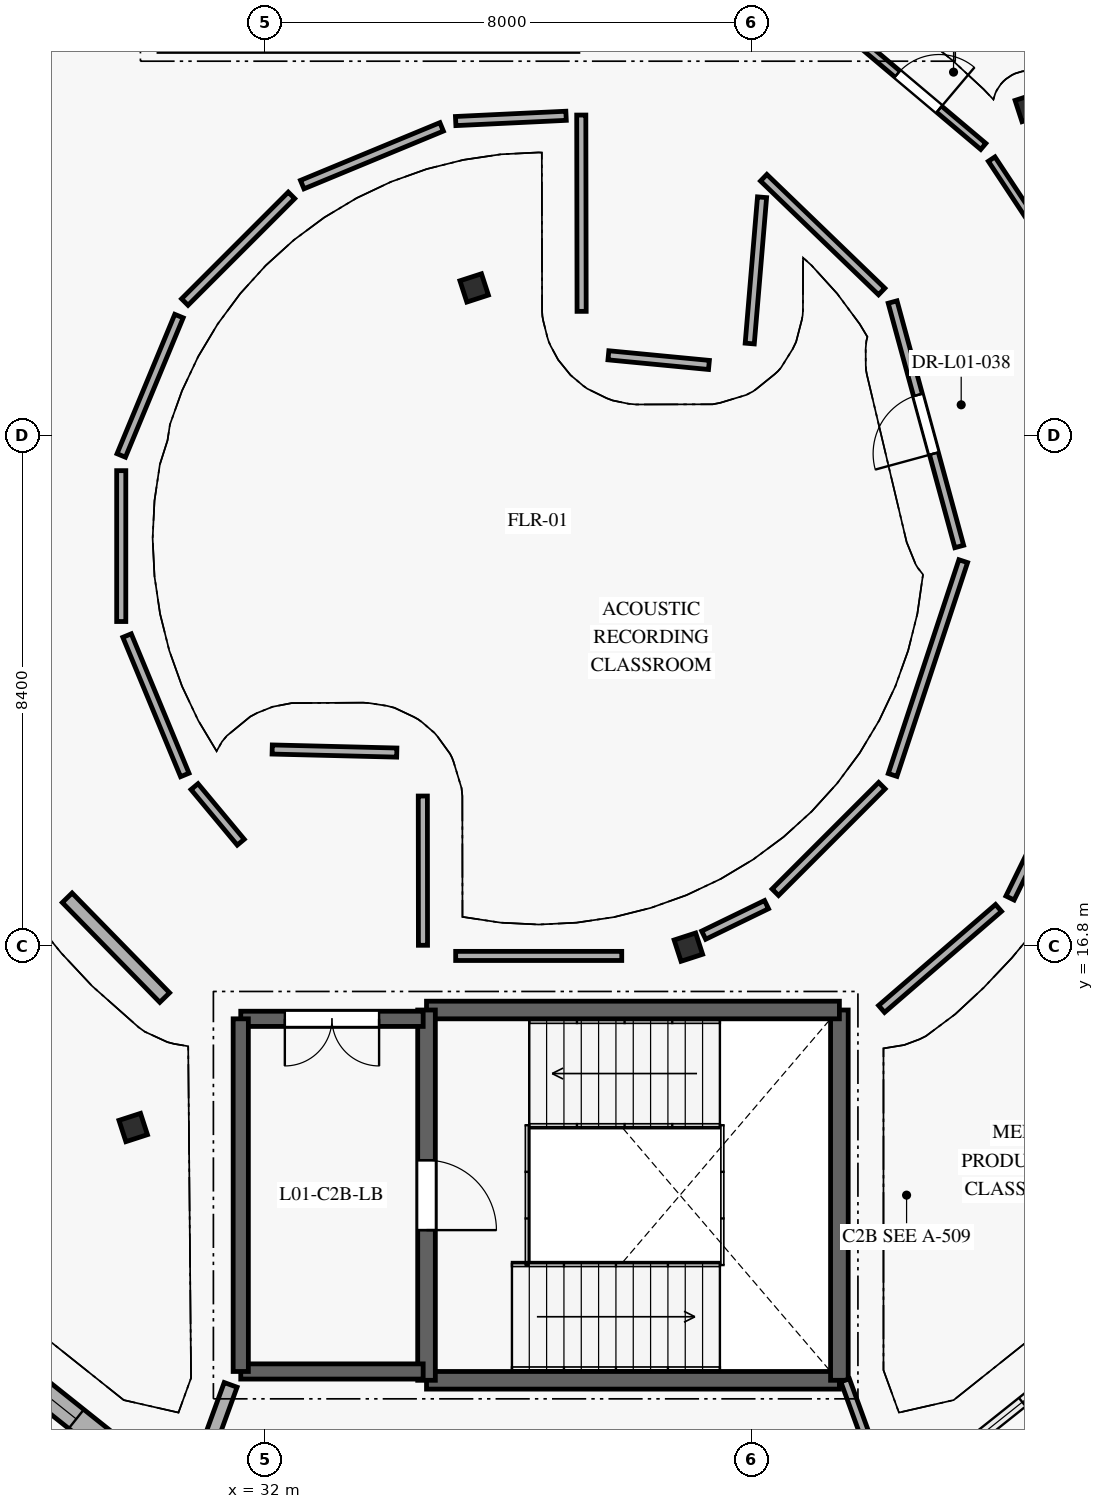
"""IFC4 building model, lengths in metres.
Left out: names, types, materials, properties, quantities, classifications, styles, units other than length and angle.
Written with IfcOpenShell. Run it as: python <this file> out.ifc"""

import sys

from ifc_helpers import new_model, si_unit, direction, frame, frame_2d, origin, origin_2d, place, context, subcontext, project, spatial, rectangle, i_section, extrude, element, fill, save


model = new_model("IFC4")
c1 = context("Model", 3, precision=1e-05, world=origin(), true_north=direction((0.0, 1.0)))
c2 = subcontext(c1, "Body", "Model", "MODEL_VIEW")
j1 = project(units=[si_unit("LENGTHUNIT", "METRE"), si_unit("PLANEANGLEUNIT", "RADIAN")], contexts=[c1])
p1 = place(None, origin())
s1 = spatial("IfcSite", under=j1, at=p1, CompositionType="ELEMENT")
p2 = place(p1, origin())
s2 = spatial("IfcBuilding", under=s1, at=p2, CompositionType="ELEMENT")
p3 = place(p2, frame((0.0, 0.0, 4.2)))
s3 = spatial("IfcBuildingStorey", under=s2, at=p3, CompositionType="ELEMENT", Elevation=4.2)
for number, where, z_axis, x_axis in (
    (1, (29.831, 13.812, 0.0), (0.0, 0.0, 1.0), (0.951, 0.309, 0.0)),
    (2, (38.961, 16.779, 0.0), (0.0, 0.0, 1.0), (0.951, 0.309, 0.0)),
    (3, (35.439, 27.621, 0.0), (0.0, 0.0, 1.0), (0.951, 0.309, 0.0)),
    (4, (44.569, 30.588, 0.0), (0.0, 0.0, 1.0), (0.951, 0.309, 0.0)),
):
    element("IfcColumn", number, at=place(p3, frame(where, z_axis=z_axis, x_axis=x_axis)), inside=s3, PredefinedType="COLUMN", context=c2, shape_type="SweptSolid", body=[
        extrude(i_section(OverallWidth=0.373, OverallDepth=0.368, WebThickness=0.014, FlangeThickness=0.024, FilletRadius=0.015, at=origin_2d()), origin(), (0.0, 0.0, 1.0), 4.2),
    ])
p4 = place(p3, frame((29.351, 8.655, 0.0), z_axis=(0.0, 0.0, 1.0), x_axis=(-0.781819636461, 0.623504655992, 0.0)))
e5 = element("IfcWall", 5, at=p4, inside=s3, PredefinedType="SOLIDWALL", context=c2, shape_type="SweptSolid", body=[
    extrude(rectangle(XDim=7.333, YDim=0.4, at=frame_2d((3.667, 0.0))), origin(), (0.0, 0.0, 1.0), 3.94),
])
p5 = place(p4, frame((0.583, 0.0, 0.85)))
e6 = element("IfcOpeningElement", 6, at=p5, cuts=e5, PredefinedType="OPENING", context=c2, shape_type="SweptSolid", body=[
    extrude(rectangle(XDim=2.5, YDim=1.3, at=frame_2d((1.25, 0.65))), frame((0.0, 0.21, 0.0), z_axis=(0.0, -1.0, 0.0), x_axis=(1.0, 0.0, 0.0)), (0.0, 0.0, 1.0), 0.42),
])
p6 = place(p4, frame((4.925, 0.0, 0.85)))
e7 = element("IfcOpeningElement", 7, at=p6, cuts=e5, PredefinedType="OPENING", context=c2, shape_type="SweptSolid", body=[
    extrude(rectangle(XDim=1.15, YDim=1.5, at=frame_2d((0.575, 0.75))), frame((0.0, 0.21, 0.0), z_axis=(0.0, -1.0, 0.0), x_axis=(1.0, 0.0, 0.0)), (0.0, 0.0, 1.0), 0.42),
])
p7 = place(p3, frame((23.037, 12.27, 0.0), z_axis=(0.0, 0.0, 1.0), x_axis=(0.781821002863, -0.623502942641, 0.0)))
e8 = element("IfcWall", 8, at=p7, inside=s3, PredefinedType="ELEMENTEDWALL", context=c2, shape_type="SweptSolid", body=[
    extrude(rectangle(XDim=7.047, YDim=0.225, at=frame_2d((3.524, 0.0))), origin(), (0.0, 0.0, 1.0), 1.09),
])
p8 = place(p3, frame((44.452, 7.876, 0.0), z_axis=(0.0, 0.0, 1.0), x_axis=(0.781844515492, 0.623473458613, 0.0)))
e9 = element("IfcWall", 9, at=p8, inside=s3, PredefinedType="ELEMENTEDWALL", context=c2, shape_type="SweptSolid", body=[
    extrude(rectangle(XDim=7.048, YDim=0.225, at=frame_2d((3.524, 0.0))), origin(), (0.0, 0.0, 1.0), 1.09),
])
p9 = place(p3, frame((34.655, 9.655, 0.0), z_axis=(0.0, 0.0, 1.0), x_axis=(1.0, 0.0, 0.0)))
e10 = element("IfcWall", 10, at=p9, inside=s3, PredefinedType="SHEAR", context=c2, shape_type="SweptSolid", body=[
    extrude(rectangle(XDim=6.79, YDim=0.29, at=frame_2d((3.395, 0.0))), origin(), (0.0, 0.0, 1.0), 3.95),
])
p10 = place(p3, frame((41.445, 9.655, 0.0), z_axis=(0.0, 0.0, 1.0), x_axis=(0.0, 1.0, 0.0)))
e11 = element("IfcWall", 11, at=p10, inside=s3, PredefinedType="SHEAR", context=c2, shape_type="SweptSolid", body=[
    extrude(rectangle(XDim=6.09, YDim=0.29, at=frame_2d((3.045, 0.0))), origin(), (0.0, 0.0, 1.0), 3.95),
])
p11 = place(p3, frame((41.445, 15.745, 0.0), z_axis=(0.0, 0.0, 1.0), x_axis=(-1.0, 0.0, 0.0)))
e12 = element("IfcWall", 12, at=p11, inside=s3, PredefinedType="SHEAR", context=c2, shape_type="SweptSolid", body=[
    extrude(rectangle(XDim=6.79, YDim=0.29, at=frame_2d((3.395, 0.0))), origin(), (0.0, 0.0, 1.0), 3.95),
])
p12 = place(p3, frame((34.655, 15.745, 0.0), z_axis=(0.0, 0.0, 1.0), x_axis=(0.0, -1.0, 0.0)))
e13 = element("IfcWall", 13, at=p12, inside=s3, PredefinedType="SHEAR", context=c2, shape_type="SweptSolid", body=[
    extrude(rectangle(XDim=6.09, YDim=0.29, at=frame_2d((3.045, 0.0))), origin(), (0.0, 0.0, 1.0), 3.95),
])
p13 = place(p12, frame((2.47, 0.0, 0.0)))
e14 = element("IfcOpeningElement", 14, at=p13, cuts=e13, PredefinedType="OPENING", context=c2, shape_type="SweptSolid", body=[
    extrude(rectangle(XDim=1.15, YDim=2.1, at=frame_2d((0.575, 1.05))), frame((0.0, 0.155, 0.0), z_axis=(0.0, -1.0, 0.0), x_axis=(1.0, 0.0, 0.0)), (0.0, 0.0, 1.0), 0.31),
])
p14 = place(p3, frame((31.6, 9.8, 0.0), z_axis=(0.0, 0.0, 1.0), x_axis=(1.0, 0.0, 0.0)))
e15 = element("IfcWall", 15, at=p14, inside=s3, PredefinedType="SHEAR", context=c2, shape_type="SweptSolid", body=[
    extrude(rectangle(XDim=3.0, YDim=0.25, at=frame_2d((1.5, 0.0))), origin(), (0.0, 0.0, 1.0), 3.95),
])
p15 = place(p3, frame((34.6, 15.6, 0.0), z_axis=(0.0, 0.0, 1.0), x_axis=(-1.0, 0.0, 0.0)))
e16 = element("IfcWall", 16, at=p15, inside=s3, PredefinedType="SHEAR", context=c2, shape_type="SweptSolid", body=[
    extrude(rectangle(XDim=3.0, YDim=0.25, at=frame_2d((1.5, 0.0))), origin(), (0.0, 0.0, 1.0), 3.95),
])
p16 = place(p15, frame((0.725, 0.0, 0.0)))
e17 = element("IfcOpeningElement", 17, at=p16, cuts=e16, PredefinedType="OPENING", context=c2, shape_type="SweptSolid", body=[
    extrude(rectangle(XDim=1.55, YDim=2.15, at=frame_2d((0.775, 1.075))), frame((0.0, 0.135, 0.0), z_axis=(0.0, -1.0, 0.0), x_axis=(1.0, 0.0, 0.0)), (0.0, 0.0, 1.0), 0.27),
])
p17 = place(p3, frame((31.6, 15.6, 0.0), z_axis=(0.0, 0.0, 1.0), x_axis=(0.0, -1.0, 0.0)))
e18 = element("IfcWall", 18, at=p17, inside=s3, PredefinedType="SHEAR", context=c2, shape_type="SweptSolid", body=[
    extrude(rectangle(XDim=5.8, YDim=0.25, at=frame_2d((2.9, 0.0))), origin(), (0.0, 0.0, 1.0), 3.95),
])
p18 = place(p3, frame((30.997, 8.382, 0.0), z_axis=(0.0, 0.0, 1.0), x_axis=(0.342065800562, 0.939676001655, 0.0)))
e19 = element("IfcWall", 19, at=p18, inside=s3, PredefinedType="PARTITIONING", context=c2, shape_type="SweptSolid", body=[
    extrude(rectangle(XDim=1.275, YDim=0.225, at=frame_2d((0.638, 0.0))), origin(), (0.0, 0.0, 1.0), 3.9),
])
p19 = place(p3, frame((30.349, 15.95, 0.0), z_axis=(0.0, 0.0, 1.0), x_axis=(-0.698811708899, 0.715305665786, 0.0)))
e20 = element("IfcWall", 20, at=p19, inside=s3, PredefinedType="PARTITIONING", context=c2, shape_type="SweptSolid", body=[
    extrude(rectangle(XDim=2.294, YDim=0.225, at=frame_2d((1.147, 0.0))), origin(), (0.0, 0.0, 1.0), 3.9),
])
p20 = place(p3, frame((40.247, 17.478, 0.0), z_axis=(0.0, 0.0, 1.0), x_axis=(-0.899429373924, -0.437066129234, 0.0)))
e21 = element("IfcWall", 21, at=p20, inside=s3, PredefinedType="PARTITIONING", context=c2, shape_type="SweptSolid", body=[
    extrude(rectangle(XDim=1.148, YDim=0.15, at=frame_2d((0.574, 0.0))), origin(), (0.0, 0.0, 1.0), 3.219),
])
p21 = place(p3, frame((41.539, 9.655, 0.0), z_axis=(0.0, 0.0, 1.0), x_axis=(0.341945571893, -0.939719759217, 0.0)))
e22 = element("IfcWall", 22, at=p21, inside=s3, PredefinedType="PARTITIONING", context=c2, shape_type="SweptSolid", body=[
    extrude(rectangle(XDim=1.355, YDim=0.15, at=frame_2d((0.678, 0.0))), origin(), (0.0, 0.0, 1.0), 3.9),
])
p22 = place(p3, frame((45.814, 20.779, 0.0), z_axis=(0.0, 0.0, 1.0), x_axis=(-0.439779254339, -0.89810589991, 0.0)))
e23 = element("IfcWall", 23, at=p22, inside=s3, PredefinedType="PARTITIONING", context=c2, shape_type="SweptSolid", body=[
    extrude(rectangle(XDim=3.554, YDim=0.15, at=frame_2d((1.777, 0.0))), origin(), (0.0, 0.0, 1.0), 3.9),
])
p23 = place(p3, frame((44.062, 17.424, 0.0), z_axis=(0.0, 0.0, 1.0), x_axis=(-0.756768999512, -0.653682401, 0.0)))
e24 = element("IfcWall", 24, at=p23, inside=s3, PredefinedType="PARTITIONING", context=c2, shape_type="SweptSolid", body=[
    extrude(rectangle(XDim=2.541, YDim=0.15, at=frame_2d((1.271, 0.0))), origin(), (0.0, 0.0, 1.0), 3.9),
])
p24 = place(p3, frame((41.673, 31.752, 0.0), z_axis=(0.0, 0.0, 1.0), x_axis=(0.764524009618, -0.644595251858, 0.0)))
e25 = element("IfcWall", 25, at=p24, inside=s3, PredefinedType="PARTITIONING", context=c2, shape_type="SweptSolid", body=[
    extrude(rectangle(XDim=2.797, YDim=0.13, at=frame_2d((1.398, 0.0))), origin(), (0.0, 0.0, 1.0), 3.9),
])
p25 = place(p24, frame((0.948, 0.0, 0.0)))
e26 = element("IfcOpeningElement", 26, at=p25, cuts=e25, PredefinedType="OPENING", context=c2, shape_type="SweptSolid", body=[
    extrude(rectangle(XDim=0.9, YDim=2.05, at=frame_2d((0.45, 1.025))), frame((0.0, 0.075, 0.0), z_axis=(0.0, -1.0, 0.0), x_axis=(1.0, 0.0, 0.0)), (0.0, 0.0, 1.0), 0.15),
])
p26 = place(p3, frame((43.949, 29.74, 0.0), z_axis=(0.0, 0.0, 1.0), x_axis=(0.551022081773, -0.83449066226, 0.0)))
e27 = element("IfcWall", 27, at=p26, inside=s3, PredefinedType="PARTITIONING", context=c2, shape_type="SweptSolid", body=[
    extrude(rectangle(XDim=2.439, YDim=0.13, at=frame_2d((1.22, 0.0))), origin(), (0.0, 0.0, 1.0), 3.369),
])
p27 = place(p3, frame((42.32, 19.611, 0.0), z_axis=(0.0, 0.0, 1.0), x_axis=(0.313635484033, 0.949543460383, 0.0)))
e28 = element("IfcWall", 28, at=p27, inside=s3, PredefinedType="PARTITIONING", context=c2, shape_type="SweptSolid", body=[
    extrude(rectangle(XDim=3.703, YDim=0.15, at=frame_2d((1.852, 0.0))), origin(), (0.0, 0.0, 1.0), 3.9),
])
p28 = place(p3, frame((43.416, 23.368, 0.0), z_axis=(0.0, 0.0, 1.0), x_axis=(-0.262938935949, 0.964812477097, 0.0)))
e29 = element("IfcWall", 29, at=p28, inside=s3, PredefinedType="PARTITIONING", context=c2, shape_type="SweptSolid", body=[
    extrude(rectangle(XDim=4.167, YDim=0.15, at=frame_2d((2.083, 0.0))), origin(), (0.0, 0.0, 1.0), 3.9),
])
p29 = place(p28, frame((1.584, 0.0, 0.0)))
e30 = element("IfcOpeningElement", 30, at=p29, cuts=e29, PredefinedType="OPENING", context=c2, shape_type="SweptSolid", body=[
    extrude(rectangle(XDim=1.0, YDim=2.1, at=frame_2d((0.5, 1.05))), frame((0.0, 0.085, 0.0), z_axis=(0.0, -1.0, 0.0), x_axis=(1.0, 0.0, 0.0)), (0.0, 0.0, 1.0), 0.17),
])
p30 = place(p3, frame((42.141, 27.562, 0.0), z_axis=(0.0, 0.0, 1.0), x_axis=(-0.719849143542, 0.694130542867, 0.0)))
e31 = element("IfcWall", 31, at=p30, inside=s3, PredefinedType="PARTITIONING", context=c2, shape_type="SweptSolid", body=[
    extrude(rectangle(XDim=2.696, YDim=0.15, at=frame_2d((1.348, 0.0))), origin(), (0.0, 0.0, 1.0), 3.9),
])
p31 = place(p3, frame((40.173, 29.112, 0.0), z_axis=(0.0, 0.0, 1.0), x_axis=(-0.083924087796, -0.996472150884, 0.0)))
e32 = element("IfcWall", 32, at=p31, inside=s3, PredefinedType="PARTITIONING", context=c2, shape_type="SweptSolid", body=[
    extrude(rectangle(XDim=2.415, YDim=0.15, at=frame_2d((1.207, 0.0))), origin(), (0.0, 0.0, 1.0), 3.9),
])
p32 = place(p3, frame((39.3, 26.354, 0.0), z_axis=(0.0, 0.0, 1.0), x_axis=(-0.995426515274, 0.095530375746, 0.0)))
e33 = element("IfcWall", 33, at=p32, inside=s3, PredefinedType="PARTITIONING", context=c2, shape_type="SweptSolid", body=[
    extrude(rectangle(XDim=1.661, YDim=0.15, at=frame_2d((0.831, 0.0))), origin(), (0.0, 0.0, 1.0), 3.9),
])
p33 = place(p3, frame((37.206, 27.236, 0.0), z_axis=(0.0, 0.0, 1.0), x_axis=(-0.001814879044, 0.999998353106, 0.0)))
e34 = element("IfcWall", 34, at=p33, inside=s3, PredefinedType="PARTITIONING", context=c2, shape_type="SweptSolid", body=[
    extrude(rectangle(XDim=3.229, YDim=0.15, at=frame_2d((1.614, 0.0))), origin(), (0.0, 0.0, 1.0), 3.9),
])
p34 = place(p3, frame((36.95, 30.452, 0.0), z_axis=(0.0, 0.0, 1.0), x_axis=(-0.998855948809, -0.04782043004, 0.0)))
e35 = element("IfcWall", 35, at=p34, inside=s3, PredefinedType="PARTITIONING", context=c2, shape_type="SweptSolid", body=[
    extrude(rectangle(XDim=1.818, YDim=0.15, at=frame_2d((0.909, 0.0))), origin(), (0.0, 0.0, 1.0), 3.9),
])
p35 = place(p3, frame((34.904, 30.27, 0.0), z_axis=(0.0, 0.0, 1.0), x_axis=(-0.92387534344, -0.38269354552, 0.0)))
e36 = element("IfcWall", 36, at=p35, inside=s3, PredefinedType="PARTITIONING", context=c2, shape_type="SweptSolid", body=[
    extrude(rectangle(XDim=2.482, YDim=0.15, at=frame_2d((1.241, 0.0))), origin(), (0.0, 0.0, 1.0), 3.9),
])
for number, where, z_axis, x_axis in (
    (37, (32.434, 29.144, 0.0), (0.0, 0.0, 1.0), (-0.707, -0.707, 0.0)),
    (38, (30.584, 27.158, 0.0), (0.0, 0.0, 1.0), (-0.383, -0.924, 0.0)),
):
    element("IfcWall", number, at=place(p3, frame(where, z_axis=z_axis, x_axis=x_axis)), inside=s3, PredefinedType="PARTITIONING", context=c2, shape_type="SweptSolid", body=[
        extrude(rectangle(XDim=2.481, YDim=0.15, at=frame_2d((1.241, 0.0))), origin(), (0.0, 0.0, 1.0), 3.9),
    ])
p36 = place(p3, frame((29.635, 24.615, 0.0), z_axis=(0.0, 0.0, 1.0), x_axis=(0.0, -1.0, 0.0)))
e39 = element("IfcWall", 39, at=p36, inside=s3, PredefinedType="PARTITIONING", context=c2, shape_type="SweptSolid", body=[
    extrude(rectangle(XDim=2.481, YDim=0.15, at=frame_2d((1.24, 0.0))), origin(), (0.0, 0.0, 1.0), 3.9),
])
p37 = place(p3, frame((29.73, 21.903, 0.0), z_axis=(0.0, 0.0, 1.0), x_axis=(0.382679137355, -0.923881311551, 0.0)))
e40 = element("IfcWall", 40, at=p37, inside=s3, PredefinedType="PARTITIONING", context=c2, shape_type="SweptSolid", body=[
    extrude(rectangle(XDim=2.481, YDim=0.15, at=frame_2d((1.241, 0.0))), origin(), (0.0, 0.0, 1.0), 3.9),
])
p38 = place(p3, frame((30.84, 19.419, 0.0), z_axis=(0.0, 0.0, 1.0), x_axis=(0.63967929126, -0.76864192205, 0.0)))
e41 = element("IfcWall", 41, at=p38, inside=s3, PredefinedType="PARTITIONING", context=c2, shape_type="SweptSolid", body=[
    extrude(rectangle(XDim=1.189, YDim=0.15, at=frame_2d((0.594, 0.0))), origin(), (0.0, 0.0, 1.0), 3.9),
])
p39 = place(p3, frame((32.117, 20.03, 0.0), z_axis=(0.0, 0.0, 1.0), x_axis=(0.999695996787, -0.024655912229, 0.0)))
e42 = element("IfcWall", 42, at=p39, inside=s3, PredefinedType="PARTITIONING", context=c2, shape_type="SweptSolid", body=[
    extrude(rectangle(XDim=2.05, YDim=0.15, at=frame_2d((1.025, 0.0))), origin(), (0.0, 0.0, 1.0), 3.9),
])
p40 = place(p3, frame((34.594, 19.264, 0.0), z_axis=(0.0, 0.0, 1.0), x_axis=(0.000994529593, -0.999999505455, 0.0)))
e43 = element("IfcWall", 43, at=p40, inside=s3, PredefinedType="PARTITIONING", context=c2, shape_type="SweptSolid", body=[
    extrude(rectangle(XDim=2.455, YDim=0.15, at=frame_2d((1.228, 0.0))), origin(), (0.0, 0.0, 1.0), 3.9),
])
p41 = place(p3, frame((35.135, 16.635, 0.0), z_axis=(0.0, 0.0, 1.0), x_axis=(1.0, 0.0, 0.0)))
e44 = element("IfcWall", 44, at=p41, inside=s3, PredefinedType="PARTITIONING", context=c2, shape_type="SweptSolid", body=[
    extrude(rectangle(XDim=2.731, YDim=0.15, at=frame_2d((1.365, 0.0))), origin(), (0.0, 0.0, 1.0), 3.219),
])
p42 = place(p3, frame((40.391, 17.682, 0.0), z_axis=(0.0, 0.0, 1.0), x_axis=(0.70715603118, 0.707057527763, 0.0)))
e45 = element("IfcWall", 45, at=p42, inside=s3, PredefinedType="PARTITIONING", context=c2, shape_type="SweptSolid", body=[
    extrude(rectangle(XDim=2.479, YDim=0.15, at=frame_2d((1.239, 0.0))), origin(), (0.0, 0.0, 1.0), 3.9),
])
p43 = place(p5, origin())
e46 = element("IfcWindow", 46, at=p43, inside=s3, PartitioningType="SINGLE_PANEL", PredefinedType="WINDOW", context=c2, shape_type="SweptSolid", body=[
    extrude(rectangle(XDim=2.5, YDim=1.3, at=frame_2d((1.25, 0.65))), frame((0.0, 0.03, 0.0), z_axis=(0.0, -1.0, 0.0), x_axis=(1.0, 0.0, 0.0)), (0.0, 0.0, 1.0), 0.06),
])
fill(e6, e46)
p44 = place(p13, origin())
e47 = element("IfcDoor", 47, at=p44, inside=s3, OperationType="SINGLE_SWING_RIGHT", PredefinedType="DOOR", context=c2, shape_type="SweptSolid", body=[
    extrude(rectangle(XDim=1.15, YDim=2.1, at=frame_2d((0.575, 1.05))), frame((0.0, 0.025, 0.0), z_axis=(0.0, -1.0, 0.0), x_axis=(1.0, 0.0, 0.0)), (0.0, 0.0, 1.0), 0.05),
])
fill(e14, e47)
p45 = place(p16, origin())
e48 = element("IfcDoor", 48, at=p45, inside=s3, OperationType="DOUBLE_DOOR_SINGLE_SWING", PredefinedType="DOOR", context=c2, shape_type="SweptSolid", body=[
    extrude(rectangle(XDim=1.55, YDim=2.15, at=frame_2d((0.775, 1.075))), frame((0.0, 0.025, 0.0), z_axis=(0.0, -1.0, 0.0), x_axis=(1.0, 0.0, 0.0)), (0.0, 0.0, 1.0), 0.05),
])
fill(e17, e48)
p46 = place(p25, origin())
e49 = element("IfcDoor", 49, at=p46, inside=s3, OperationType="SINGLE_SWING_RIGHT", PredefinedType="DOOR", context=c2, shape_type="SweptSolid", body=[
    extrude(rectangle(XDim=0.9, YDim=2.05, at=frame_2d((0.45, 1.025))), frame((0.0, 0.025, 0.0), z_axis=(0.0, -1.0, 0.0), x_axis=(1.0, 0.0, 0.0)), (0.0, 0.0, 1.0), 0.05),
])
fill(e26, e49)
p47 = place(p29, origin())
e50 = element("IfcDoor", 50, at=p47, inside=s3, OperationType="SINGLE_SWING_LEFT", PredefinedType="DOOR", context=c2, shape_type="SweptSolid", body=[
    extrude(rectangle(XDim=1.0, YDim=2.1, at=frame_2d((0.5, 1.05))), frame((0.0, 0.025, 0.0), z_axis=(0.0, -1.0, 0.0), x_axis=(1.0, 0.0, 0.0)), (0.0, 0.0, 1.0), 0.05),
])
fill(e30, e50)
save(model, sys.argv[1])
